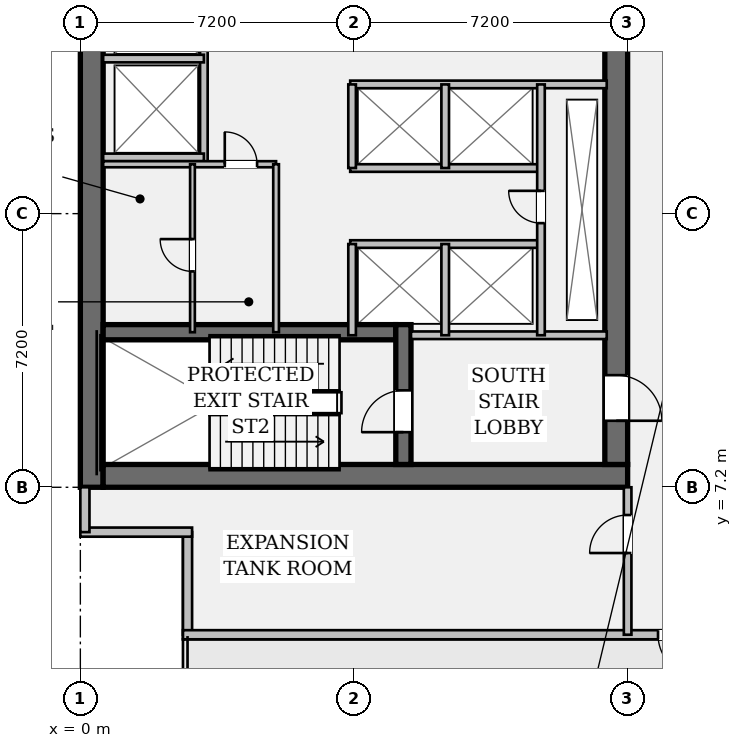
"""IFC4 building model, lengths in metres.
Left out: names, types, materials, properties, quantities, classifications, styles, units other than length and angle.
Written with IfcOpenShell. Run it as: python <this file> out.ifc"""

import sys

from ifc_helpers import new_model, si_unit, direction, frame, frame_2d, origin, place, context, subcontext, project, spatial, rectangle, extrude, element, fill, save


model = new_model("IFC4")
c1 = context("Model", 3, precision=1e-05, world=origin(), true_north=direction((0.0, 1.0)))
c2 = subcontext(c1, "Body", "Model", "MODEL_VIEW")
j1 = project(units=[si_unit("LENGTHUNIT", "METRE"), si_unit("PLANEANGLEUNIT", "RADIAN")], contexts=[c1])
p1 = place(None, origin())
s1 = spatial("IfcSite", under=j1, at=p1, CompositionType="ELEMENT")
p2 = place(p1, origin())
s2 = spatial("IfcBuilding", under=s1, at=p2, CompositionType="ELEMENT")
p3 = place(p2, frame((0.0, 0.0, 92.75)))
s3 = spatial("IfcBuildingStorey", under=s2, at=p3, CompositionType="ELEMENT", Elevation=92.75)
p4 = place(p3, frame((0.3, 7.2, 0.0), z_axis=(0.0, 0.0, 1.0), x_axis=(0.0, 1.0, 0.0)))
e1 = element("IfcWall", 1, at=p4, inside=s3, PredefinedType="SHEAR", context=c2, shape_type="SweptSolid", body=[
    extrude(rectangle(XDim=28.8, YDim=0.6, at=frame_2d((14.4, 0.0))), origin(), (0.0, 0.0, 1.0), 4.6),
])
p5 = place(p3, frame((0.6, 7.5, 0.0), z_axis=(0.0, 0.0, 1.0), x_axis=(1.0, 0.0, 0.0)))
e2 = element("IfcWall", 2, at=p5, inside=s3, PredefinedType="SHEAR", context=c2, shape_type="SweptSolid", body=[
    extrude(rectangle(XDim=13.8, YDim=0.6, at=frame_2d((6.9, 0.0))), origin(), (0.0, 0.0, 1.0), 4.6),
])
p6 = place(p3, frame((14.1, 35.4, 0.0), z_axis=(0.0, 0.0, 1.0), x_axis=(0.0, -1.0, 0.0)))
e3 = element("IfcWall", 3, at=p6, inside=s3, PredefinedType="SHEAR", context=c2, shape_type="SweptSolid", body=[
    extrude(rectangle(XDim=27.6, YDim=0.6, at=frame_2d((13.8, 0.0))), origin(), (0.0, 0.0, 1.0), 4.6),
])
p7 = place(p6, frame((1.3, 0.0, 0.0)))
e4 = element("IfcOpeningElement", 4, at=p7, cuts=e3, PredefinedType="OPENING", context=c2, shape_type="SweptSolid", body=[
    extrude(rectangle(XDim=1.2, YDim=2.15, at=frame_2d((0.6, 1.075))), frame((0.0, 0.312, 0.0), z_axis=(0.0, -1.0, 0.0), x_axis=(1.0, 0.0, 0.0)), (0.0, 0.0, 1.0), 0.624),
])
p8 = place(p6, frame((25.25, 0.0, 0.0)))
e5 = element("IfcOpeningElement", 5, at=p8, cuts=e3, PredefinedType="OPENING", context=c2, shape_type="SweptSolid", body=[
    extrude(rectangle(XDim=1.2, YDim=2.15, at=frame_2d((0.6, 1.075))), frame((0.0, 0.312, 0.0), z_axis=(0.0, -1.0, 0.0), x_axis=(1.0, 0.0, 0.0)), (0.0, 0.0, 1.0), 0.624),
])
p9 = place(p6, frame((14.6, 0.0, 0.0)))
e6 = element("IfcOpeningElement", 6, at=p9, cuts=e3, PredefinedType="OPENING", context=c2, shape_type="SweptSolid", body=[
    extrude(rectangle(XDim=1.6, YDim=2.2, at=frame_2d((0.8, 1.1))), frame((0.0, 0.312, 0.0), z_axis=(0.0, -1.0, 0.0), x_axis=(1.0, 0.0, 0.0)), (0.0, 0.0, 1.0), 0.624),
])
p10 = place(p3, frame((0.6, 11.28, 0.0), z_axis=(0.0, 0.0, 1.0), x_axis=(1.0, 0.0, 0.0)))
e7 = element("IfcWall", 7, at=p10, inside=s3, PredefinedType="SHEAR", context=c2, shape_type="SweptSolid", body=[
    extrude(rectangle(XDim=7.7, YDim=0.4, at=frame_2d((3.85, 0.0))), origin(), (0.0, 0.0, 1.0), 4.6),
])
p11 = place(p3, frame((8.5, 7.8, 0.0), z_axis=(0.0, 0.0, 1.0), x_axis=(0.0, 1.0, 0.0)))
e8 = element("IfcWall", 8, at=p11, inside=s3, PredefinedType="SHEAR", context=c2, shape_type="SweptSolid", body=[
    extrude(rectangle(XDim=3.68, YDim=0.4, at=frame_2d((1.84, 0.0))), origin(), (0.0, 0.0, 1.0), 4.6),
])
p12 = place(p11, frame((0.85, 0.0, 0.0)))
e9 = element("IfcOpeningElement", 9, at=p12, cuts=e8, PredefinedType="OPENING", context=c2, shape_type="SweptSolid", body=[
    extrude(rectangle(XDim=1.1, YDim=2.15, at=frame_2d((0.55, 1.075))), frame((0.0, 0.212, 0.0), z_axis=(0.0, -1.0, 0.0), x_axis=(1.0, 0.0, 0.0)), (0.0, 0.0, 1.0), 0.424),
])
p13 = place(p3, frame((2.82, 3.32, 0.0), z_axis=(0.0, 0.0, 1.0), x_axis=(0.0, 1.0, 0.0)))
e10 = element("IfcWall", 10, at=p13, inside=s3, PredefinedType="STANDARD", context=c2, shape_type="SweptSolid", body=[
    extrude(rectangle(XDim=2.7, YDim=0.24, at=frame_2d((1.35, 0.0))), origin(), (0.0, 0.0, 1.0), 4.6),
])
p14 = place(p3, frame((2.94, 6.02, 0.0), z_axis=(0.0, 0.0, 1.0), x_axis=(-1.0, 0.0, 0.0)))
e11 = element("IfcWall", 11, at=p14, inside=s3, PredefinedType="STANDARD", context=c2, shape_type="SweptSolid", body=[
    extrude(rectangle(XDim=2.94, YDim=0.24, at=frame_2d((1.47, 0.0))), origin(), (0.0, 0.0, 1.0), 4.6),
])
p15 = place(p3, frame((0.12, 6.02, 0.0), z_axis=(0.0, 0.0, 1.0), x_axis=(0.0, 1.0, 0.0)))
e12 = element("IfcWall", 12, at=p15, inside=s3, PredefinedType="STANDARD", context=c2, shape_type="SweptSolid", body=[
    extrude(rectangle(XDim=1.18, YDim=0.24, at=frame_2d((0.59, 0.0))), origin(), (0.0, 0.0, 1.0), 4.6),
])
p16 = place(p3, frame((44.5, 3.32, 0.0), z_axis=(0.0, 0.0, 1.0), x_axis=(-1.0, 0.0, 0.0)))
e13 = element("IfcWall", 13, at=p16, inside=s3, PredefinedType="STANDARD", context=c2, shape_type="SweptSolid", body=[
    extrude(rectangle(XDim=41.8, YDim=0.24, at=frame_2d((20.9, 0.0))), origin(), (0.0, 0.0, 1.0), 3.185),
])
p17 = place(p16, frame((28.2, 0.0, 0.0)))
e14 = element("IfcOpeningElement", 14, at=p17, cuts=e13, PredefinedType="OPENING", context=c2, shape_type="SweptSolid", body=[
    extrude(rectangle(XDim=1.1, YDim=2.15, at=frame_2d((0.55, 1.075))), frame((0.0, 0.132, 0.0), z_axis=(0.0, -1.0, 0.0), x_axis=(1.0, 0.0, 0.0)), (0.0, 0.0, 1.0), 0.264),
])
p18 = place(p3, frame((8.7, 11.2, 0.0), z_axis=(0.0, 0.0, 1.0), x_axis=(1.0, 0.0, 0.0)))
e15 = element("IfcWall", 15, at=p18, inside=s3, PredefinedType="PARTITIONING", context=c2, shape_type="SweptSolid", body=[
    extrude(rectangle(XDim=5.15, YDim=0.2, at=frame_2d((2.575, 0.0))), origin(), (0.0, 0.0, 1.0), 4.6),
])
p19 = place(p3, frame((3.25, 15.7, 0.0), z_axis=(0.0, 0.0, 1.0), x_axis=(0.0, 1.0, 0.0)))
e16 = element("IfcWall", 16, at=p19, inside=s3, PredefinedType="PARTITIONING", context=c2, shape_type="SweptSolid", body=[
    extrude(rectangle(XDim=13.08, YDim=0.2, at=frame_2d((6.54, 0.0))), origin(), (0.0, 0.0, 1.0), 4.6),
])
for number, where, z_axis, x_axis in (
    (17, (0.6, 15.88, 0.0), (0.0, 0.0, 1.0), (1.0, 0.0, 0.0)),
    (18, (0.6, 18.48, 0.0), (0.0, 0.0, 1.0), (1.0, 0.0, 0.0)),
):
    element("IfcWall", number, at=place(p3, frame(where, z_axis=z_axis, x_axis=x_axis)), inside=s3, PredefinedType="PARTITIONING", context=c2, shape_type="SweptSolid", body=[
        extrude(rectangle(XDim=2.65, YDim=0.2, at=frame_2d((1.325, 0.0))), origin(), (0.0, 0.0, 1.0), 4.6),
    ])
p20 = place(p3, frame((7.1, 17.8, 0.0), z_axis=(0.0, 0.0, 1.0), x_axis=(1.0, 0.0, 0.0)))
e19 = element("IfcWall", 19, at=p20, inside=s3, PredefinedType="PARTITIONING", context=c2, shape_type="SweptSolid", body=[
    extrude(rectangle(XDim=6.75, YDim=0.2, at=frame_2d((3.375, 0.0))), origin(), (0.0, 0.0, 1.0), 4.6),
])
for number, where, z_axis, x_axis in (
    (20, (7.1, 15.6, 0.0), (0.0, 0.0, 1.0), (1.0, 0.0, 0.0)),
    (21, (7.1, 13.6, 0.0), (0.0, 0.0, 1.0), (1.0, 0.0, 0.0)),
):
    element("IfcWall", number, at=place(p3, frame(where, z_axis=z_axis, x_axis=x_axis)), inside=s3, PredefinedType="PARTITIONING", context=c2, shape_type="SweptSolid", body=[
        extrude(rectangle(XDim=5.02, YDim=0.2, at=frame_2d((2.51, 0.0))), origin(), (0.0, 0.0, 1.0), 4.6),
    ])
p21 = place(p3, frame((7.15, 15.6, 0.0), z_axis=(0.0, 0.0, 1.0), x_axis=(0.0, 1.0, 0.0)))
e22 = element("IfcWall", 22, at=p21, inside=s3, PredefinedType="PARTITIONING", context=c2, shape_type="SweptSolid", body=[
    extrude(rectangle(XDim=2.2, YDim=0.2, at=frame_2d((1.1, 0.0))), origin(), (0.0, 0.0, 1.0), 4.6),
])
p22 = place(p3, frame((7.15, 11.2, 0.0), z_axis=(0.0, 0.0, 1.0), x_axis=(0.0, 1.0, 0.0)))
e23 = element("IfcWall", 23, at=p22, inside=s3, PredefinedType="PARTITIONING", context=c2, shape_type="SweptSolid", body=[
    extrude(rectangle(XDim=2.4, YDim=0.2, at=frame_2d((1.2, 0.0))), origin(), (0.0, 0.0, 1.0), 4.6),
])
p23 = place(p3, frame((9.6, 15.6, 0.0), z_axis=(0.0, 0.0, 1.0), x_axis=(0.0, 1.0, 0.0)))
e24 = element("IfcWall", 24, at=p23, inside=s3, PredefinedType="PARTITIONING", context=c2, shape_type="SweptSolid", body=[
    extrude(rectangle(XDim=2.2, YDim=0.2, at=frame_2d((1.1, 0.0))), origin(), (0.0, 0.0, 1.0), 4.6),
])
p24 = place(p3, frame((9.6, 11.2, 0.0), z_axis=(0.0, 0.0, 1.0), x_axis=(0.0, 1.0, 0.0)))
e25 = element("IfcWall", 25, at=p24, inside=s3, PredefinedType="PARTITIONING", context=c2, shape_type="SweptSolid", body=[
    extrude(rectangle(XDim=2.4, YDim=0.2, at=frame_2d((1.2, 0.0))), origin(), (0.0, 0.0, 1.0), 4.6),
])
p25 = place(p3, frame((12.12, 11.2, 0.0), z_axis=(0.0, 0.0, 1.0), x_axis=(0.0, 1.0, 0.0)))
e26 = element("IfcWall", 26, at=p25, inside=s3, PredefinedType="PARTITIONING", context=c2, shape_type="SweptSolid", body=[
    extrude(rectangle(XDim=6.6, YDim=0.2, at=frame_2d((3.3, 0.0))), origin(), (0.0, 0.0, 1.0), 4.6),
])
p26 = place(p25, frame((2.95, 0.0, 0.0)))
e27 = element("IfcOpeningElement", 27, at=p26, cuts=e26, PredefinedType="OPENING", context=c2, shape_type="SweptSolid", body=[
    extrude(rectangle(XDim=0.85, YDim=2.15, at=frame_2d((0.425, 1.075))), frame((0.0, 0.112, 0.0), z_axis=(0.0, -1.0, 0.0), x_axis=(1.0, 0.0, 0.0)), (0.0, 0.0, 1.0), 0.224),
])
p27 = place(p3, frame((0.6, 15.7, 0.0), z_axis=(0.0, 0.0, 1.0), x_axis=(1.0, 0.0, 0.0)))
e28 = element("IfcWall", 28, at=p27, inside=s3, PredefinedType="PARTITIONING", context=c2, shape_type="SweptSolid", body=[
    extrude(rectangle(XDim=4.55, YDim=0.16, at=frame_2d((2.275, 0.0))), origin(), (0.0, 0.0, 1.0), 4.6),
])
p28 = place(p27, frame((3.2, 0.0, 0.0)))
e29 = element("IfcOpeningElement", 29, at=p28, cuts=e28, PredefinedType="OPENING", context=c2, shape_type="SweptSolid", body=[
    extrude(rectangle(XDim=0.85, YDim=2.15, at=frame_2d((0.425, 1.075))), frame((0.0, 0.092, 0.0), z_axis=(0.0, -1.0, 0.0), x_axis=(1.0, 0.0, 0.0)), (0.0, 0.0, 1.0), 0.184),
])
p29 = place(p3, frame((5.15, 11.28, 0.0), z_axis=(0.0, 0.0, 1.0), x_axis=(0.0, 1.0, 0.0)))
e30 = element("IfcWall", 30, at=p29, inside=s3, PredefinedType="PARTITIONING", context=c2, shape_type="SweptSolid", body=[
    extrude(rectangle(XDim=4.42, YDim=0.15, at=frame_2d((2.21, 0.0))), origin(), (0.0, 0.0, 1.0), 4.6),
])
p30 = place(p3, frame((2.95, 11.28, 0.0), z_axis=(0.0, 0.0, 1.0), x_axis=(0.0, 1.0, 0.0)))
e31 = element("IfcWall", 31, at=p30, inside=s3, PredefinedType="PARTITIONING", context=c2, shape_type="SweptSolid", body=[
    extrude(rectangle(XDim=4.42, YDim=0.125, at=frame_2d((2.21, 0.0))), origin(), (0.0, 0.0, 1.0), 4.6),
])
p31 = place(p30, frame((1.6, 0.0, 0.0)))
e32 = element("IfcOpeningElement", 32, at=p31, cuts=e31, PredefinedType="OPENING", context=c2, shape_type="SweptSolid", body=[
    extrude(rectangle(XDim=0.85, YDim=2.15, at=frame_2d((0.425, 1.075))), frame((0.0, 0.074, 0.0), z_axis=(0.0, -1.0, 0.0), x_axis=(1.0, 0.0, 0.0)), (0.0, 0.0, 1.0), 0.149),
])
p32 = place(p3, frame((14.4, 3.32, 0.0), z_axis=(0.0, 0.0, 1.0), x_axis=(0.0, 1.0, 0.0)))
e33 = element("IfcWall", 33, at=p32, inside=s3, PredefinedType="PARTITIONING", context=c2, shape_type="SweptSolid", body=[
    extrude(rectangle(XDim=3.88, YDim=0.2, at=frame_2d((1.94, 0.0))), origin(), (0.0, 0.0, 1.0), 3.467),
])
p33 = place(p32, frame((2.15, 0.0, 0.0)))
e34 = element("IfcOpeningElement", 34, at=p33, cuts=e33, PredefinedType="OPENING", context=c2, shape_type="SweptSolid", body=[
    extrude(rectangle(XDim=1.0, YDim=2.15, at=frame_2d((0.5, 1.075))), frame((0.0, 0.112, 0.0), z_axis=(0.0, -1.0, 0.0), x_axis=(1.0, 0.0, 0.0)), (0.0, 0.0, 1.0), 0.224),
])
p34 = place(p17, origin())
e35 = element("IfcDoor", 35, at=p34, inside=s3, OperationType="SINGLE_SWING_LEFT", PredefinedType="DOOR", context=c2, shape_type="SweptSolid", body=[
    extrude(rectangle(XDim=1.1, YDim=2.15, at=frame_2d((0.55, 1.075))), frame((0.0, 0.025, 0.0), z_axis=(0.0, -1.0, 0.0), x_axis=(1.0, 0.0, 0.0)), (0.0, 0.0, 1.0), 0.05),
])
fill(e14, e35)
p35 = place(p12, origin())
e36 = element("IfcDoor", 36, at=p35, inside=s3, OperationType="SINGLE_SWING_LEFT", PredefinedType="DOOR", context=c2, shape_type="SweptSolid", body=[
    extrude(rectangle(XDim=1.1, YDim=2.15, at=frame_2d((0.55, 1.075))), frame((0.0, 0.025, 0.0), z_axis=(0.0, -1.0, 0.0), x_axis=(1.0, 0.0, 0.0)), (0.0, 0.0, 1.0), 0.05),
])
fill(e9, e36)
p36 = place(p8, origin())
e37 = element("IfcDoor", 37, at=p36, inside=s3, OperationType="SINGLE_SWING_RIGHT", PredefinedType="DOOR", context=c2, shape_type="SweptSolid", body=[
    extrude(rectangle(XDim=1.2, YDim=2.15, at=frame_2d((0.6, 1.075))), frame((0.0, 0.025, 0.0), z_axis=(0.0, -1.0, 0.0), x_axis=(1.0, 0.0, 0.0)), (0.0, 0.0, 1.0), 0.05),
])
fill(e5, e37)
p37 = place(p26, origin())
e38 = element("IfcDoor", 38, at=p37, inside=s3, OperationType="SINGLE_SWING_RIGHT", PredefinedType="DOOR", context=c2, shape_type="SweptSolid", body=[
    extrude(rectangle(XDim=0.85, YDim=2.15, at=frame_2d((0.425, 1.075))), frame((0.0, 0.025, 0.0), z_axis=(0.0, -1.0, 0.0), x_axis=(1.0, 0.0, 0.0)), (0.0, 0.0, 1.0), 0.05),
])
fill(e27, e38)
p38 = place(p28, origin())
e39 = element("IfcDoor", 39, at=p38, inside=s3, OperationType="SINGLE_SWING_LEFT", PredefinedType="DOOR", context=c2, shape_type="SweptSolid", body=[
    extrude(rectangle(XDim=0.85, YDim=2.15, at=frame_2d((0.425, 1.075))), frame((0.0, 0.025, 0.0), z_axis=(0.0, -1.0, 0.0), x_axis=(1.0, 0.0, 0.0)), (0.0, 0.0, 1.0), 0.05),
])
fill(e29, e39)
p39 = place(p31, origin())
e40 = element("IfcDoor", 40, at=p39, inside=s3, OperationType="SINGLE_SWING_RIGHT", PredefinedType="DOOR", context=c2, shape_type="SweptSolid", body=[
    extrude(rectangle(XDim=0.85, YDim=2.15, at=frame_2d((0.425, 1.075))), frame((0.0, 0.025, 0.0), z_axis=(0.0, -1.0, 0.0), x_axis=(1.0, 0.0, 0.0)), (0.0, 0.0, 1.0), 0.05),
])
fill(e32, e40)
p40 = place(p33, origin())
e41 = element("IfcDoor", 41, at=p40, inside=s3, OperationType="SINGLE_SWING_LEFT", PredefinedType="DOOR", context=c2, shape_type="SweptSolid", body=[
    extrude(rectangle(XDim=1.0, YDim=2.15, at=frame_2d((0.5, 1.075))), frame((0.0, 0.025, 0.0), z_axis=(0.0, -1.0, 0.0), x_axis=(1.0, 0.0, 0.0)), (0.0, 0.0, 1.0), 0.05),
])
fill(e34, e41)
save(model, sys.argv[1])
